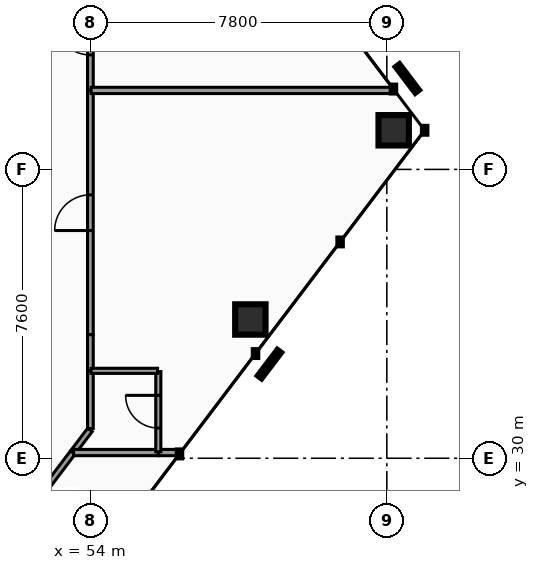
"""IFC4 building model, lengths in metres.
Left out: names, types, materials, properties, quantities, classifications, styles, units other than length and angle.
Written with IfcOpenShell. Run it as: python <this file> out.ifc"""

import sys

from ifc_helpers import new_model, si_unit, direction, frame, frame_2d, origin, origin_2d, place, context, subcontext, project, spatial, rectangle, hollow_rectangle, extrude, element, fill, save


model = new_model("IFC4")
c1 = context("Model", 3, precision=1e-05, world=origin(), true_north=direction((0.0, 1.0)))
c2 = subcontext(c1, "Body", "Model", "MODEL_VIEW")
j1 = project(units=[si_unit("LENGTHUNIT", "METRE"), si_unit("PLANEANGLEUNIT", "RADIAN")], contexts=[c1])
p1 = place(None, origin())
s1 = spatial("IfcSite", under=j1, at=p1, CompositionType="ELEMENT")
p2 = place(p1, origin())
s2 = spatial("IfcBuilding", under=s1, at=p2, CompositionType="ELEMENT")
p3 = place(p2, frame((0.0, 0.0, 127.16)))
s3 = spatial("IfcBuildingStorey", under=s2, at=p3, CompositionType="ELEMENT", Elevation=127.16)
for number, where, z_axis, x_axis in (
    (1, (58.209, 33.651, 0.0), (0.0, 0.0, 1.0), (1.0, 0.0, 0.0)),
    (2, (61.981, 38.629, 0.0), (0.0, 0.0, 1.0), (1.0, 0.0, 0.0)),
):
    element("IfcColumn", number, at=place(p3, frame(where, z_axis=z_axis, x_axis=x_axis)), inside=s3, PredefinedType="COLUMN", context=c2, shape_type="SweptSolid", body=[
        extrude(hollow_rectangle(XDim=0.8, YDim=0.8, WallThickness=0.04, at=origin_2d()), origin(), (0.0, 0.0, 1.0), 3.5),
    ])
p4 = place(p3, frame((51.662, 27.675, 0.0), z_axis=(0.0, 0.0, 1.0), x_axis=(0.603831940294, 0.797111653334, 0.0)))
e3 = element("IfcWall", 3, at=p4, inside=s3, PredefinedType="PARTITIONING", context=c2, shape_type="SweptSolid", body=[
    extrude(rectangle(XDim=3.104, YDim=0.15, at=frame_2d((1.552, 0.0))), origin(), (0.0, 0.0, 1.0), 2.457),
])
p5 = place(p3, frame((54.0, 33.25, 0.0), z_axis=(0.0, 0.0, 1.0), x_axis=(0.0, 1.0, 0.0)))
e4 = element("IfcWall", 4, at=p5, inside=s3, PredefinedType="PARTITIONING", context=c2, shape_type="SweptSolid", body=[
    extrude(rectangle(XDim=6.423, YDim=0.15, at=frame_2d((3.212, 0.0))), origin(), (0.0, 0.0, 1.0), 2.457),
])
p6 = place(p5, frame((2.742, 0.0, 0.0)))
e5 = element("IfcOpeningElement", 5, at=p6, cuts=e4, PredefinedType="OPENING", context=c2, shape_type="SweptSolid", body=[
    extrude(rectangle(XDim=0.94, YDim=2.05, at=frame_2d((0.47, 1.025))), frame((0.0, 0.085, 0.0), z_axis=(0.0, -1.0, 0.0), x_axis=(1.0, 0.0, 0.0)), (0.0, 0.0, 1.0), 0.17),
])
p7 = place(p3, frame((54.0, 32.305, 0.0), z_axis=(0.0, 0.0, 1.0), x_axis=(0.0, 1.0, 0.0)))
e6 = element("IfcWall", 6, at=p7, inside=s3, PredefinedType="PARTITIONING", context=c2, shape_type="SweptSolid", body=[
    extrude(rectangle(XDim=0.945, YDim=0.15, at=frame_2d((0.473, 0.0))), origin(), (0.0, 0.0, 1.0), 2.457),
])
p8 = place(p3, frame((54.0, 30.781, 0.0), z_axis=(0.0, 0.0, 1.0), x_axis=(0.0, 1.0, 0.0)))
e7 = element("IfcWall", 7, at=p8, inside=s3, PredefinedType="PARTITIONING", context=c2, shape_type="SweptSolid", body=[
    extrude(rectangle(XDim=1.514, YDim=0.15, at=frame_2d((0.757, 0.0))), origin(), (0.0, 0.0, 1.0), 2.457),
])
p9 = place(p3, frame((53.54, 30.154, 0.0), z_axis=(0.0, 0.0, 1.0), x_axis=(0.603680225987, 0.797226557982, 0.0)))
e8 = element("IfcWall", 8, at=p9, inside=s3, PredefinedType="PARTITIONING", context=c2, shape_type="SweptSolid", body=[
    extrude(rectangle(XDim=0.742, YDim=0.15, at=frame_2d((0.371, 0.0))), origin(), (0.0, 0.0, 1.0), 2.457),
])
p10 = place(p3, frame((54.0, 39.683, 0.0), z_axis=(0.0, 0.0, 1.0), x_axis=(0.0, 1.0, 0.0)))
e9 = element("IfcWall", 9, at=p10, inside=s3, PredefinedType="PARTITIONING", context=c2, shape_type="SweptSolid", body=[
    extrude(rectangle(XDim=2.797, YDim=0.15, at=frame_2d((1.398, 0.0))), origin(), (0.0, 0.0, 1.0), 2.457),
])
p11 = place(p10, frame((0.928, 0.0, 0.0)))
e10 = element("IfcOpeningElement", 10, at=p11, cuts=e9, PredefinedType="OPENING", context=c2, shape_type="SweptSolid", body=[
    extrude(rectangle(XDim=0.94, YDim=2.05, at=frame_2d((0.47, 1.025))), frame((0.0, 0.085, 0.0), z_axis=(0.0, -1.0, 0.0), x_axis=(1.0, 0.0, 0.0)), (0.0, 0.0, 1.0), 0.17),
])
p12 = place(p3, frame((55.792, 30.15, 0.0), z_axis=(0.0, 0.0, 1.0), x_axis=(1.0, 0.0, 0.0)))
e11 = element("IfcWall", 11, at=p12, inside=s3, PredefinedType="PARTITIONING", context=c2, shape_type="SweptSolid", body=[
    extrude(rectangle(XDim=0.565, YDim=0.165, at=frame_2d((0.283, 0.0))), origin(), (0.0, 0.0, 1.0), 2.457),
])
p13 = place(p3, frame((53.557, 30.15, 0.0), z_axis=(0.0, 0.0, 1.0), x_axis=(1.0, 0.0, 0.0)))
e12 = element("IfcWall", 12, at=p13, inside=s3, PredefinedType="PARTITIONING", context=c2, shape_type="SweptSolid", body=[
    extrude(rectangle(XDim=2.225, YDim=0.165, at=frame_2d((1.113, 0.0))), origin(), (0.0, 0.0, 1.0), 2.457),
])
p14 = place(p3, frame((55.787, 30.17, 0.0), z_axis=(0.0, 0.0, 1.0), x_axis=(0.0, 1.0, 0.0)))
e13 = element("IfcWall", 13, at=p14, inside=s3, PredefinedType="PARTITIONING", context=c2, shape_type="SweptSolid", body=[
    extrude(rectangle(XDim=2.11, YDim=0.135, at=frame_2d((1.055, 0.0))), origin(), (0.0, 0.0, 1.0), 2.457),
])
p15 = place(p14, frame((0.625, 0.0, 0.0)))
e14 = element("IfcOpeningElement", 14, at=p15, cuts=e13, PredefinedType="OPENING", context=c2, shape_type="SweptSolid", body=[
    extrude(rectangle(XDim=0.86, YDim=2.05, at=frame_2d((0.43, 1.025))), frame((0.0, 0.077, 0.0), z_axis=(0.0, -1.0, 0.0), x_axis=(1.0, 0.0, 0.0)), (0.0, 0.0, 1.0), 0.155),
])
p16 = place(p3, frame((54.02, 32.3, 0.0), z_axis=(0.0, 0.0, 1.0), x_axis=(1.0, 0.0, 0.0)))
e15 = element("IfcWall", 15, at=p16, inside=s3, PredefinedType="PARTITIONING", context=c2, shape_type="SweptSolid", body=[
    extrude(rectangle(XDim=1.747, YDim=0.135, at=frame_2d((0.874, 0.0))), origin(), (0.0, 0.0, 1.0), 2.457),
])
p17 = place(p3, frame((54.02, 39.678, 0.0), z_axis=(0.0, 0.0, 1.0), x_axis=(1.0, 0.0, 0.0)))
e16 = element("IfcWall", 16, at=p17, inside=s3, PredefinedType="PARTITIONING", context=c2, shape_type="SweptSolid", body=[
    extrude(rectangle(XDim=7.967, YDim=0.165, at=frame_2d((3.983, 0.0))), origin(), (0.0, 0.0, 1.0), 2.457),
])
p18 = place(p6, origin())
e17 = element("IfcDoor", 17, at=p18, inside=s3, OperationType="SINGLE_SWING_LEFT", PredefinedType="DOOR", context=c2, shape_type="SweptSolid", body=[
    extrude(rectangle(XDim=0.94, YDim=2.05, at=frame_2d((0.47, 1.025))), frame((0.0, 0.025, 0.0), z_axis=(0.0, -1.0, 0.0), x_axis=(1.0, 0.0, 0.0)), (0.0, 0.0, 1.0), 0.05),
])
fill(e5, e17)
p19 = place(p11, origin())
e18 = element("IfcDoor", 18, at=p19, inside=s3, OperationType="SINGLE_SWING_RIGHT", PredefinedType="DOOR", context=c2, shape_type="SweptSolid", body=[
    extrude(rectangle(XDim=0.94, YDim=2.05, at=frame_2d((0.47, 1.025))), frame((0.0, 0.025, 0.0), z_axis=(0.0, -1.0, 0.0), x_axis=(1.0, 0.0, 0.0)), (0.0, 0.0, 1.0), 0.05),
])
fill(e10, e18)
p20 = place(p15, origin())
e19 = element("IfcDoor", 19, at=p20, inside=s3, OperationType="SINGLE_SWING_RIGHT", PredefinedType="DOOR", context=c2, shape_type="SweptSolid", body=[
    extrude(rectangle(XDim=0.86, YDim=2.05, at=frame_2d((0.43, 1.025))), frame((0.0, 0.025, 0.0), z_axis=(0.0, -1.0, 0.0), x_axis=(1.0, 0.0, 0.0)), (0.0, 0.0, 1.0), 0.05),
])
fill(e14, e19)
save(model, sys.argv[1])
